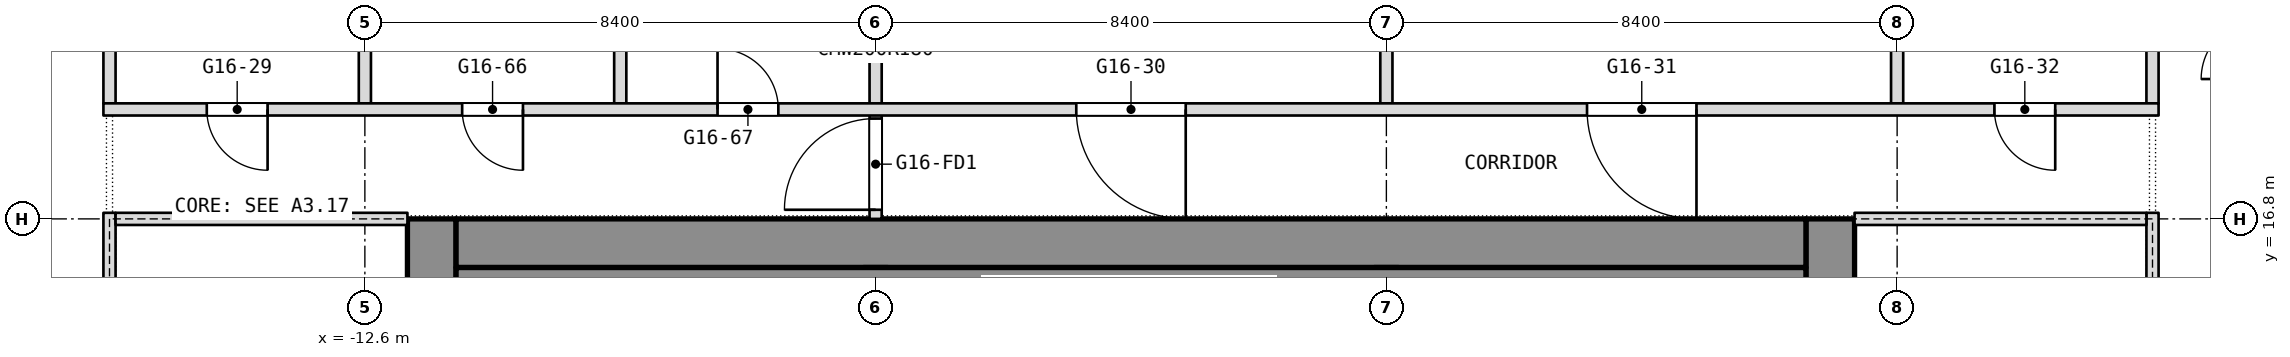
"""IFC4 building model, lengths in metres.
Left out: names, types, materials, properties, quantities, classifications, styles, units other than length and angle.
Written with IfcOpenShell. Run it as: python <this file> out.ifc"""

import sys

from ifc_helpers import new_model, si_unit, direction, frame, frame_2d, origin, place, context, subcontext, project, spatial, rectangle, extrude, element, fill, save


model = new_model("IFC4")
c1 = context("Model", 3, precision=1e-05, world=origin(), true_north=direction((0.0, 1.0)))
c2 = subcontext(c1, "Body", "Model", "MODEL_VIEW")
j1 = project(units=[si_unit("LENGTHUNIT", "METRE"), si_unit("PLANEANGLEUNIT", "RADIAN")], contexts=[c1])
p1 = place(None, origin())
s1 = spatial("IfcSite", under=j1, at=p1, CompositionType="ELEMENT")
p2 = place(p1, origin())
s2 = spatial("IfcBuilding", under=s1, at=p2, CompositionType="ELEMENT")
p3 = place(p2, frame((0.0, 0.0, 202.1)))
s3 = spatial("IfcBuildingStorey", under=s2, at=p3, CompositionType="ELEMENT", Elevation=202.1)
p4 = place(p3, frame((11.5, 0.0, 0.0), z_axis=(0.0, 0.0, 1.0), x_axis=(0.0, 1.0, 0.0)))
e1 = element("IfcWall", 1, at=p4, inside=s3, PredefinedType="SHEAR", context=c2, shape_type="SweptSolid", body=[
    extrude(rectangle(XDim=16.8, YDim=0.8, at=frame_2d((8.4, 0.0))), origin(), (0.0, 0.0, 1.0), 3.6),
])
p5 = place(p4, frame((2.3, 0.0, 0.0)))
e2 = element("IfcOpeningElement", 2, at=p5, cuts=e1, PredefinedType="OPENING", context=c2, shape_type="SweptSolid", body=[
    extrude(rectangle(XDim=1.1, YDim=2.1, at=frame_2d((0.55, 1.05))), frame((0.0, 0.4, 0.0), z_axis=(0.0, -1.0, 0.0), x_axis=(1.0, 0.0, 0.0)), (0.0, 0.0, 1.0), 0.8),
])
p6 = place(p4, frame((4.85, 0.0, 0.0)))
e3 = element("IfcOpeningElement", 3, at=p6, cuts=e1, PredefinedType="OPENING", context=c2, shape_type="SweptSolid", body=[
    extrude(rectangle(XDim=1.1, YDim=2.1, at=frame_2d((0.55, 1.05))), frame((0.0, 0.4, 0.0), z_axis=(0.0, -1.0, 0.0), x_axis=(1.0, 0.0, 0.0)), (0.0, 0.0, 1.0), 0.8),
])
p7 = place(p4, frame((6.825, 0.0, 0.0)))
e4 = element("IfcOpeningElement", 4, at=p7, cuts=e1, PredefinedType="OPENING", context=c2, shape_type="SweptSolid", body=[
    extrude(rectangle(XDim=1.2, YDim=2.1, at=frame_2d((0.6, 1.05))), frame((0.0, 0.4, 0.0), z_axis=(0.0, -1.0, 0.0), x_axis=(1.0, 0.0, 0.0)), (0.0, 0.0, 1.0), 0.8),
])
p8 = place(p4, frame((13.4, 0.0, 0.0)))
e5 = element("IfcOpeningElement", 5, at=p8, cuts=e1, PredefinedType="OPENING", context=c2, shape_type="SweptSolid", body=[
    extrude(rectangle(XDim=1.1, YDim=2.1, at=frame_2d((0.55, 1.05))), frame((0.0, 0.4, 0.0), z_axis=(0.0, -1.0, 0.0), x_axis=(1.0, 0.0, 0.0)), (0.0, 0.0, 1.0), 0.8),
])
p9 = place(p4, frame((10.85, 0.0, 0.0)))
e6 = element("IfcOpeningElement", 6, at=p9, cuts=e1, PredefinedType="OPENING", context=c2, shape_type="SweptSolid", body=[
    extrude(rectangle(XDim=1.1, YDim=2.1, at=frame_2d((0.55, 1.05))), frame((0.0, 0.4, 0.0), z_axis=(0.0, -1.0, 0.0), x_axis=(1.0, 0.0, 0.0)), (0.0, 0.0, 1.0), 0.8),
])
p10 = place(p4, frame((8.775, 0.0, 0.0)))
e7 = element("IfcOpeningElement", 7, at=p10, cuts=e1, PredefinedType="OPENING", context=c2, shape_type="SweptSolid", body=[
    extrude(rectangle(XDim=1.2, YDim=2.1, at=frame_2d((0.6, 1.05))), frame((0.0, 0.4, 0.0), z_axis=(0.0, -1.0, 0.0), x_axis=(1.0, 0.0, 0.0)), (0.0, 0.0, 1.0), 0.8),
])
p11 = place(p3, frame((-11.5, 0.0, 0.0), z_axis=(0.0, 0.0, 1.0), x_axis=(0.0, 1.0, 0.0)))
e8 = element("IfcWall", 8, at=p11, inside=s3, PredefinedType="SHEAR", context=c2, shape_type="SweptSolid", body=[
    extrude(rectangle(XDim=16.8, YDim=0.8, at=frame_2d((8.4, 0.0))), origin(), (0.0, 0.0, 1.0), 3.6),
])
p12 = place(p11, frame((3.6, 0.0, 0.0)))
e9 = element("IfcOpeningElement", 9, at=p12, cuts=e8, PredefinedType="OPENING", context=c2, shape_type="SweptSolid", body=[
    extrude(rectangle(XDim=0.9, YDim=2.1, at=frame_2d((0.45, 1.05))), frame((0.0, 0.4, 0.0), z_axis=(0.0, -1.0, 0.0), x_axis=(1.0, 0.0, 0.0)), (0.0, 0.0, 1.0), 0.8),
])
p13 = place(p11, frame((6.825, 0.0, 0.0)))
e10 = element("IfcOpeningElement", 10, at=p13, cuts=e8, PredefinedType="OPENING", context=c2, shape_type="SweptSolid", body=[
    extrude(rectangle(XDim=1.2, YDim=2.1, at=frame_2d((0.6, 1.05))), frame((0.0, 0.4, 0.0), z_axis=(0.0, -1.0, 0.0), x_axis=(1.0, 0.0, 0.0)), (0.0, 0.0, 1.0), 0.8),
])
p14 = place(p11, frame((14.062, 0.0, 0.0)))
e11 = element("IfcOpeningElement", 11, at=p14, cuts=e8, PredefinedType="OPENING", context=c2, shape_type="SweptSolid", body=[
    extrude(rectangle(XDim=0.9, YDim=2.1, at=frame_2d((0.45, 1.05))), frame((0.0, 0.4, 0.0), z_axis=(0.0, -1.0, 0.0), x_axis=(1.0, 0.0, 0.0)), (0.0, 0.0, 1.0), 0.8),
])
p15 = place(p11, frame((11.438, 0.0, 0.0)))
e12 = element("IfcOpeningElement", 12, at=p15, cuts=e8, PredefinedType="OPENING", context=c2, shape_type="SweptSolid", body=[
    extrude(rectangle(XDim=0.9, YDim=2.1, at=frame_2d((0.45, 1.05))), frame((0.0, 0.4, 0.0), z_axis=(0.0, -1.0, 0.0), x_axis=(1.0, 0.0, 0.0)), (0.0, 0.0, 1.0), 0.8),
])
p16 = place(p11, frame((8.775, 0.0, 0.0)))
e13 = element("IfcOpeningElement", 13, at=p16, cuts=e8, PredefinedType="OPENING", context=c2, shape_type="SweptSolid", body=[
    extrude(rectangle(XDim=1.2, YDim=2.1, at=frame_2d((0.6, 1.05))), frame((0.0, 0.4, 0.0), z_axis=(0.0, -1.0, 0.0), x_axis=(1.0, 0.0, 0.0)), (0.0, 0.0, 1.0), 0.8),
])
p17 = place(p3, frame((-11.1, 16.4, 0.0), z_axis=(0.0, 0.0, 1.0), x_axis=(1.0, 0.0, 0.0)))
e14 = element("IfcWall", 14, at=p17, inside=s3, PredefinedType="SHEAR", context=c2, shape_type="SweptSolid", body=[
    extrude(rectangle(XDim=22.2, YDim=0.8, at=frame_2d((11.1, 0.0))), origin(), (0.0, 0.0, 1.0), 3.6),
])
p18 = place(p3, frame((-4.2, 0.8, 0.0), z_axis=(0.0, 0.0, 1.0), x_axis=(0.0, 1.0, 0.0)))
e15 = element("IfcWall", 15, at=p18, inside=s3, PredefinedType="SHEAR", context=c2, shape_type="SweptSolid", body=[
    extrude(rectangle(XDim=15.2, YDim=0.4, at=frame_2d((7.6, 0.0))), origin(), (0.0, 0.0, 1.0), 3.6),
])
p19 = place(p18, frame((8.5, 0.0, 0.0)))
e16 = element("IfcOpeningElement", 16, at=p19, cuts=e15, PredefinedType="OPENING", context=c2, shape_type="SweptSolid", body=[
    extrude(rectangle(XDim=1.2, YDim=2.1, at=frame_2d((0.6, 1.05))), frame((0.0, 0.2, 0.0), z_axis=(0.0, -1.0, 0.0), x_axis=(1.0, 0.0, 0.0)), (0.0, 0.0, 1.0), 0.4),
])
p20 = place(p3, frame((4.2, 0.8, 0.0), z_axis=(0.0, 0.0, 1.0), x_axis=(0.0, 1.0, 0.0)))
e17 = element("IfcWall", 17, at=p20, inside=s3, PredefinedType="SHEAR", context=c2, shape_type="SweptSolid", body=[
    extrude(rectangle(XDim=15.2, YDim=0.4, at=frame_2d((7.6, 0.0))), origin(), (0.0, 0.0, 1.0), 3.6),
])
p21 = place(p20, frame((5.95, 0.0, 0.0)))
e18 = element("IfcOpeningElement", 18, at=p21, cuts=e17, PredefinedType="OPENING", context=c2, shape_type="SweptSolid", body=[
    extrude(rectangle(XDim=1.2, YDim=2.1, at=frame_2d((0.6, 1.05))), frame((0.0, 0.2, 0.0), z_axis=(0.0, -1.0, 0.0), x_axis=(1.0, 0.0, 0.0)), (0.0, 0.0, 1.0), 0.4),
])
for number, where, z_axis, x_axis in (
    (19, (16.8, 18.7, 0.0), (0.0, 0.0, 1.0), (0.0, 1.0, 0.0)),
    (20, (12.6, 18.7, 0.0), (0.0, 0.0, 1.0), (0.0, 1.0, 0.0)),
    (21, (4.2, 18.7, 0.0), (0.0, 0.0, 1.0), (0.0, 1.0, 0.0)),
):
    element("IfcWall", number, at=place(p3, frame(where, z_axis=z_axis, x_axis=x_axis)), inside=s3, PredefinedType="PARTITIONING", context=c2, shape_type="SweptSolid", body=[
        extrude(rectangle(XDim=3.64, YDim=0.2, at=frame_2d((1.82, 0.0))), origin(), (0.0, 0.0, 1.0), 3.34),
    ])
p22 = place(p3, frame((-4.2, 16.8, 0.0), z_axis=(0.0, 0.0, 1.0), x_axis=(0.0, 1.0, 0.0)))
e22 = element("IfcWall", 22, at=p22, inside=s3, PredefinedType="PARTITIONING", context=c2, shape_type="SweptSolid", body=[
    extrude(rectangle(XDim=5.54, YDim=0.2, at=frame_2d((2.77, 0.0))), origin(), (0.0, 0.0, 1.0), 3.34),
])
p23 = place(p22, frame((0.15, 0.0, 0.0)))
e23 = element("IfcOpeningElement", 23, at=p23, cuts=e22, PredefinedType="OPENING", context=c2, shape_type="SweptSolid", body=[
    extrude(rectangle(XDim=1.5, YDim=2.1, at=frame_2d((0.75, 1.05))), frame((0.0, 0.1, 0.0), z_axis=(0.0, -1.0, 0.0), x_axis=(1.0, 0.0, 0.0)), (0.0, 0.0, 1.0), 0.2),
])
for number, where, z_axis, x_axis in (
    (24, (-8.4, 18.7, 0.0), (0.0, 0.0, 1.0), (0.0, 1.0, 0.0)),
    (25, (-12.6, 18.7, 0.0), (0.0, 0.0, 1.0), (0.0, 1.0, 0.0)),
    (26, (-16.8, 18.7, 0.0), (0.0, 0.0, 1.0), (0.0, 1.0, 0.0)),
):
    element("IfcWall", number, at=place(p3, frame(where, z_axis=z_axis, x_axis=x_axis)), inside=s3, PredefinedType="PARTITIONING", context=c2, shape_type="SweptSolid", body=[
        extrude(rectangle(XDim=3.64, YDim=0.2, at=frame_2d((1.82, 0.0))), origin(), (0.0, 0.0, 1.0), 3.34),
    ])
p24 = place(p3, frame((-16.9, 18.6, 0.0), z_axis=(0.0, 0.0, 1.0), x_axis=(1.0, 0.0, 0.0)))
e27 = element("IfcWall", 27, at=p24, inside=s3, PredefinedType="PARTITIONING", context=c2, shape_type="SweptSolid", body=[
    extrude(rectangle(XDim=33.8, YDim=0.2, at=frame_2d((16.9, 0.0))), origin(), (0.0, 0.0, 1.0), 3.34),
])
p25 = place(p24, frame((1.7, 0.0, 0.0)))
e28 = element("IfcOpeningElement", 28, at=p25, cuts=e27, PredefinedType="OPENING", context=c2, shape_type="SweptSolid", body=[
    extrude(rectangle(XDim=1.0, YDim=2.1, at=frame_2d((0.5, 1.05))), frame((0.0, 0.1, 0.0), z_axis=(0.0, -1.0, 0.0), x_axis=(1.0, 0.0, 0.0)), (0.0, 0.0, 1.0), 0.2),
])
p26 = place(p24, frame((16.0, 0.0, 0.0)))
e29 = element("IfcOpeningElement", 29, at=p26, cuts=e27, PredefinedType="OPENING", context=c2, shape_type="SweptSolid", body=[
    extrude(rectangle(XDim=1.8, YDim=2.1, at=frame_2d((0.9, 1.05))), frame((0.0, 0.1, 0.0), z_axis=(0.0, -1.0, 0.0), x_axis=(1.0, 0.0, 0.0)), (0.0, 0.0, 1.0), 0.2),
])
p27 = place(p24, frame((24.4, 0.0, 0.0)))
e30 = element("IfcOpeningElement", 30, at=p27, cuts=e27, PredefinedType="OPENING", context=c2, shape_type="SweptSolid", body=[
    extrude(rectangle(XDim=1.8, YDim=2.1, at=frame_2d((0.9, 1.05))), frame((0.0, 0.1, 0.0), z_axis=(0.0, -1.0, 0.0), x_axis=(1.0, 0.0, 0.0)), (0.0, 0.0, 1.0), 0.2),
])
p28 = place(p24, frame((31.1, 0.0, 0.0)))
e31 = element("IfcOpeningElement", 31, at=p28, cuts=e27, PredefinedType="OPENING", context=c2, shape_type="SweptSolid", body=[
    extrude(rectangle(XDim=1.0, YDim=2.1, at=frame_2d((0.5, 1.05))), frame((0.0, 0.1, 0.0), z_axis=(0.0, -1.0, 0.0), x_axis=(1.0, 0.0, 0.0)), (0.0, 0.0, 1.0), 0.2),
])
p29 = place(p24, frame((5.9, 0.0, 0.0)))
e32 = element("IfcOpeningElement", 32, at=p29, cuts=e27, PredefinedType="OPENING", context=c2, shape_type="SweptSolid", body=[
    extrude(rectangle(XDim=1.0, YDim=2.1, at=frame_2d((0.5, 1.05))), frame((0.0, 0.1, 0.0), z_axis=(0.0, -1.0, 0.0), x_axis=(1.0, 0.0, 0.0)), (0.0, 0.0, 1.0), 0.2),
])
p30 = place(p24, frame((10.1, 0.0, 0.0)))
e33 = element("IfcOpeningElement", 33, at=p30, cuts=e27, PredefinedType="OPENING", context=c2, shape_type="SweptSolid", body=[
    extrude(rectangle(XDim=1.0, YDim=2.1, at=frame_2d((0.5, 1.05))), frame((0.0, 0.1, 0.0), z_axis=(0.0, -1.0, 0.0), x_axis=(1.0, 0.0, 0.0)), (0.0, 0.0, 1.0), 0.2),
])
p31 = place(p3, frame((-11.1, 15.65, 0.0), z_axis=(0.0, 0.0, 1.0), x_axis=(1.0, 0.0, 0.0)))
e34 = element("IfcWall", 34, at=p31, inside=s3, PredefinedType="PARTITIONING", context=c2, shape_type="SweptSolid", body=[
    extrude(rectangle(XDim=22.2, YDim=0.7, at=frame_2d((11.1, 0.0))), origin(), (0.0, 0.0, 1.0), 3.34),
])
p32 = place(p3, frame((-16.8, -0.1, 0.0), z_axis=(0.0, 0.0, 1.0), x_axis=(0.0, 1.0, 0.0)))
e35 = element("IfcWall", 35, at=p32, inside=s3, PredefinedType="PARTITIONING", context=c2, shape_type="SweptSolid", body=[
    extrude(rectangle(XDim=17.0, YDim=0.2, at=frame_2d((8.5, 0.0))), origin(), (0.0, 0.0, 1.0), 3.34),
])
p33 = place(p32, frame((2.2, 0.0, 0.0)))
e36 = element("IfcOpeningElement", 36, at=p33, cuts=e35, PredefinedType="OPENING", context=c2, shape_type="SweptSolid", body=[
    extrude(rectangle(XDim=1.8, YDim=2.1, at=frame_2d((0.9, 1.05))), frame((0.0, 0.1, 0.0), z_axis=(0.0, -1.0, 0.0), x_axis=(1.0, 0.0, 0.0)), (0.0, 0.0, 1.0), 0.2),
])
p34 = place(p32, frame((13.0, 0.0, 0.0)))
e37 = element("IfcOpeningElement", 37, at=p34, cuts=e35, PredefinedType="OPENING", context=c2, shape_type="SweptSolid", body=[
    extrude(rectangle(XDim=1.8, YDim=2.1, at=frame_2d((0.9, 1.05))), frame((0.0, 0.1, 0.0), z_axis=(0.0, -1.0, 0.0), x_axis=(1.0, 0.0, 0.0)), (0.0, 0.0, 1.0), 0.2),
])
p35 = place(p3, frame((-16.7, 16.8, 0.0), z_axis=(0.0, 0.0, 1.0), x_axis=(1.0, 0.0, 0.0)))
e38 = element("IfcWall", 38, at=p35, inside=s3, PredefinedType="PARTITIONING", context=c2, shape_type="SweptSolid", body=[
    extrude(rectangle(XDim=4.8, YDim=0.2, at=frame_2d((2.4, 0.0))), origin(), (0.0, 0.0, 1.0), 2.94),
])
p36 = place(p3, frame((16.8, -0.1, 0.0), z_axis=(0.0, 0.0, 1.0), x_axis=(0.0, 1.0, 0.0)))
e39 = element("IfcWall", 39, at=p36, inside=s3, PredefinedType="PARTITIONING", context=c2, shape_type="SweptSolid", body=[
    extrude(rectangle(XDim=17.0, YDim=0.2, at=frame_2d((8.5, 0.0))), origin(), (0.0, 0.0, 1.0), 3.34),
])
p37 = place(p36, frame((2.2, 0.0, 0.0)))
e40 = element("IfcOpeningElement", 40, at=p37, cuts=e39, PredefinedType="OPENING", context=c2, shape_type="SweptSolid", body=[
    extrude(rectangle(XDim=1.8, YDim=2.1, at=frame_2d((0.9, 1.05))), frame((0.0, 0.1, 0.0), z_axis=(0.0, -1.0, 0.0), x_axis=(1.0, 0.0, 0.0)), (0.0, 0.0, 1.0), 0.2),
])
p38 = place(p36, frame((13.0, 0.0, 0.0)))
e41 = element("IfcOpeningElement", 41, at=p38, cuts=e39, PredefinedType="OPENING", context=c2, shape_type="SweptSolid", body=[
    extrude(rectangle(XDim=1.8, YDim=2.1, at=frame_2d((0.9, 1.05))), frame((0.0, 0.1, 0.0), z_axis=(0.0, -1.0, 0.0), x_axis=(1.0, 0.0, 0.0)), (0.0, 0.0, 1.0), 0.2),
])
p39 = place(p3, frame((11.9, 16.8, 0.0), z_axis=(0.0, 0.0, 1.0), x_axis=(1.0, 0.0, 0.0)))
e42 = element("IfcWall", 42, at=p39, inside=s3, PredefinedType="PARTITIONING", context=c2, shape_type="SweptSolid", body=[
    extrude(rectangle(XDim=4.8, YDim=0.2, at=frame_2d((2.4, 0.0))), origin(), (0.0, 0.0, 1.0), 2.94),
])
p40 = place(p25, origin())
e43 = element("IfcDoor", 43, at=p40, inside=s3, OperationType="SINGLE_SWING_LEFT", PredefinedType="DOOR", context=c2, shape_type="SweptSolid", body=[
    extrude(rectangle(XDim=1.0, YDim=2.1, at=frame_2d((0.5, 1.05))), frame((0.0, 0.025, 0.0), z_axis=(0.0, -1.0, 0.0), x_axis=(1.0, 0.0, 0.0)), (0.0, 0.0, 1.0), 0.05),
])
fill(e28, e43)
p41 = place(p26, origin())
e44 = element("IfcDoor", 44, at=p41, inside=s3, OperationType="DOUBLE_DOOR_SINGLE_SWING", PredefinedType="DOOR", context=c2, shape_type="SweptSolid", body=[
    extrude(rectangle(XDim=1.8, YDim=2.1, at=frame_2d((0.9, 1.05))), frame((0.0, 0.025, 0.0), z_axis=(0.0, -1.0, 0.0), x_axis=(1.0, 0.0, 0.0)), (0.0, 0.0, 1.0), 0.05),
])
fill(e29, e44)
p42 = place(p27, origin())
e45 = element("IfcDoor", 45, at=p42, inside=s3, OperationType="DOUBLE_DOOR_SINGLE_SWING", PredefinedType="DOOR", context=c2, shape_type="SweptSolid", body=[
    extrude(rectangle(XDim=1.8, YDim=2.1, at=frame_2d((0.9, 1.05))), frame((0.0, 0.025, 0.0), z_axis=(0.0, -1.0, 0.0), x_axis=(1.0, 0.0, 0.0)), (0.0, 0.0, 1.0), 0.05),
])
fill(e30, e45)
p43 = place(p28, origin())
e46 = element("IfcDoor", 46, at=p43, inside=s3, OperationType="SINGLE_SWING_RIGHT", PredefinedType="DOOR", context=c2, shape_type="SweptSolid", body=[
    extrude(rectangle(XDim=1.0, YDim=2.1, at=frame_2d((0.5, 1.05))), frame((0.0, 0.025, 0.0), z_axis=(0.0, -1.0, 0.0), x_axis=(1.0, 0.0, 0.0)), (0.0, 0.0, 1.0), 0.05),
])
fill(e31, e46)
p44 = place(p29, origin())
e47 = element("IfcDoor", 47, at=p44, inside=s3, OperationType="SINGLE_SWING_RIGHT", PredefinedType="DOOR", context=c2, shape_type="SweptSolid", body=[
    extrude(rectangle(XDim=1.0, YDim=2.1, at=frame_2d((0.5, 1.05))), frame((0.0, 0.025, 0.0), z_axis=(0.0, -1.0, 0.0), x_axis=(1.0, 0.0, 0.0)), (0.0, 0.0, 1.0), 0.05),
])
fill(e32, e47)
p45 = place(p30, origin())
e48 = element("IfcDoor", 48, at=p45, inside=s3, OperationType="SINGLE_SWING_LEFT", PredefinedType="DOOR", context=c2, shape_type="SweptSolid", body=[
    extrude(rectangle(XDim=1.0, YDim=2.1, at=frame_2d((0.5, 1.05))), frame((0.0, 0.025, 0.0), z_axis=(0.0, -1.0, 0.0), x_axis=(1.0, 0.0, 0.0)), (0.0, 0.0, 1.0), 0.05),
])
fill(e33, e48)
p46 = place(p23, origin())
e49 = element("IfcDoor", 49, at=p46, inside=s3, OperationType="DOUBLE_DOOR_DOUBLE_SWING", PredefinedType="DOOR", context=c2, shape_type="SweptSolid", body=[
    extrude(rectangle(XDim=1.5, YDim=2.1, at=frame_2d((0.75, 1.05))), frame((0.0, 0.025, 0.0), z_axis=(0.0, -1.0, 0.0), x_axis=(1.0, 0.0, 0.0)), (0.0, 0.0, 1.0), 0.05),
])
fill(e23, e49)
save(model, sys.argv[1])
